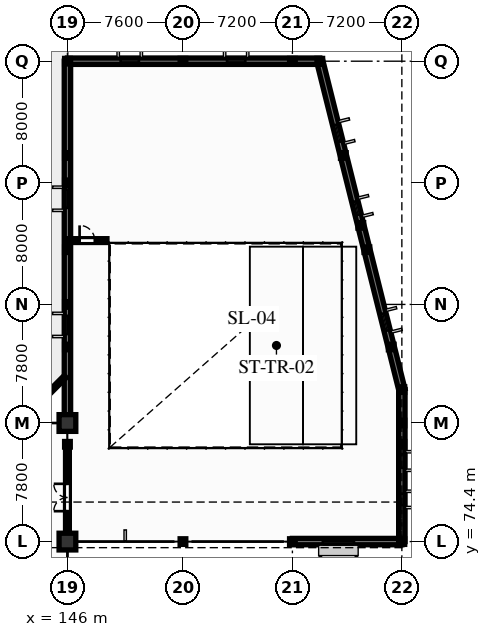
"""IFC4 building model, lengths in metres.
Left out: names, types, materials, properties, quantities, classifications, styles, units other than length and angle.
Written with IfcOpenShell. Run it as: python <this file> out.ifc"""

import sys

from ifc_helpers import new_model, si_unit, direction, frame, frame_2d, origin, origin_2d, place, context, subcontext, project, spatial, rectangle, i_section, extrude, element, fill, save


model = new_model("IFC4")
c1 = context("Model", 3, precision=1e-05, world=origin(), true_north=direction((0.0, 1.0)))
c2 = subcontext(c1, "Body", "Model", "MODEL_VIEW")
j1 = project(units=[si_unit("LENGTHUNIT", "METRE"), si_unit("PLANEANGLEUNIT", "RADIAN")], contexts=[c1])
p1 = place(None, origin())
s1 = spatial("IfcSite", under=j1, at=p1, CompositionType="ELEMENT")
p2 = place(p1, origin())
s2 = spatial("IfcBuilding", under=s1, at=p2, CompositionType="ELEMENT")
p3 = place(p2, frame((0.0, 0.0, 5.1)))
s3 = spatial("IfcBuildingStorey", under=s2, at=p3, CompositionType="ELEMENT", Elevation=5.1)
for number, where, z_axis, x_axis in (
    (1, (146.0, 74.4, 0.0), (0.0, 0.0, 1.0), (1.0, 0.0, 0.0)),
    (2, (146.0, 82.2, 0.0), (0.0, 0.0, 1.0), (1.0, 0.0, 0.0)),
):
    element("IfcColumn", number, at=place(p3, frame(where, z_axis=z_axis, x_axis=x_axis)), inside=s3, PredefinedType="COLUMN", context=c2, shape_type="SweptSolid", body=[
        extrude(rectangle(XDim=1.1, YDim=1.1, at=origin_2d()), origin(), (0.0, 0.0, 1.0), 3.84),
    ])
for number, where, z_axis, x_axis in (
    (3, (146.0, 90.0, 0.0), (0.0, 0.0, 1.0), (1.0, 0.0, 0.0)),
    (4, (146.0, 98.0, 0.0), (0.0, 0.0, 1.0), (1.0, 0.0, 0.0)),
    (5, (146.0, 106.0, 0.0), (0.0, 0.0, 1.0), (1.0, 0.0, 0.0)),
    (6, (153.6, 74.4, 0.0), (0.0, 0.0, 1.0), (1.0, 0.0, 0.0)),
    (7, (153.6, 106.0, 0.0), (0.0, 0.0, 1.0), (1.0, 0.0, 0.0)),
    (8, (160.8, 74.4, 0.0), (0.0, 0.0, 1.0), (1.0, 0.0, 0.0)),
    (9, (160.8, 106.0, 0.0), (0.0, 0.0, 1.0), (1.0, 0.0, 0.0)),
    (10, (162.6, 106.0, 0.0), (0.0, 0.0, 1.0), (1.0, 0.0, 0.0)),
    (11, (165.3, 95.2, 0.0), (0.0, 0.0, 1.0), (1.0, 0.0, 0.0)),
    (12, (168.0, 74.4, 0.0), (0.0, 0.0, 1.0), (1.0, 0.0, 0.0)),
    (13, (168.0, 82.2, 0.0), (0.0, 0.0, 1.0), (1.0, 0.0, 0.0)),
    (14, (168.0, 84.4, 0.0), (0.0, 0.0, 1.0), (1.0, 0.0, 0.0)),
    (15, (146.0, 80.8, 0.0), (0.0, 0.0, 1.0), (1.0, 0.0, 0.0)),
    (16, (168.0, 80.8, 0.0), (0.0, 0.0, 1.0), (1.0, 0.0, 0.0)),
    (17, (146.0, 87.2, 0.0), (0.0, 0.0, 1.0), (1.0, 0.0, 0.0)),
    (18, (167.3, 87.2, 0.0), (0.0, 0.0, 1.0), (1.0, 0.0, 0.0)),
    (19, (146.0, 93.6, 0.0), (0.0, 0.0, 1.0), (1.0, 0.0, 0.0)),
    (20, (165.7, 93.6, 0.0), (0.0, 0.0, 1.0), (1.0, 0.0, 0.0)),
    (21, (146.0, 99.8, 0.0), (0.0, 0.0, 1.0), (1.0, 0.0, 0.0)),
    (22, (164.15, 99.8, 0.0), (0.0, 0.0, 1.0), (1.0, 0.0, 0.0)),
):
    element("IfcColumn", number, at=place(p3, frame(where, z_axis=z_axis, x_axis=x_axis)), inside=s3, PredefinedType="COLUMN", context=c2, shape_type="SweptSolid", body=[
        extrude(i_section(OverallWidth=0.373, OverallDepth=0.368, WebThickness=0.015, FlangeThickness=0.024, at=origin_2d()), origin(), (0.0, 0.0, 1.0), 3.84),
    ])
p4 = place(p3, frame((160.8, 74.4, 0.0), z_axis=(0.0, 0.0, 1.0), x_axis=(1.0, 0.0, 0.0)))
e23 = element("IfcWall", 23, at=p4, inside=s3, PredefinedType="SOLIDWALL", context=c2, shape_type="SweptSolid", body=[
    extrude(rectangle(XDim=7.2, YDim=0.42, at=frame_2d((3.6, 0.0))), origin(), (0.0, 0.0, 1.0), 3.55),
])
p5 = place(p4, frame((2.0, 0.0, 0.9)))
e24 = element("IfcOpeningElement", 24, at=p5, cuts=e23, PredefinedType="OPENING", context=c2, shape_type="SweptSolid", body=[
    extrude(rectangle(XDim=2.05, YDim=1.85, at=frame_2d((1.025, 0.925))), frame((0.0, 0.22, 0.0), z_axis=(0.0, -1.0, 0.0), x_axis=(1.0, 0.0, 0.0)), (0.0, 0.0, 1.0), 0.44),
])
p6 = place(p3, frame((168.0, 74.4, 0.0), z_axis=(0.0, 0.0, 1.0), x_axis=(0.0, 1.0, 0.0)))
e25 = element("IfcWall", 25, at=p6, inside=s3, PredefinedType="SOLIDWALL", context=c2, shape_type="SweptSolid", body=[
    extrude(rectangle(XDim=10.0, YDim=0.42, at=frame_2d((5.0, 0.0))), origin(), (0.0, 0.0, 1.0), 3.55),
])
p7 = place(p6, frame((2.4, 0.0, 0.838)))
e26 = element("IfcOpeningElement", 26, at=p7, cuts=e25, PredefinedType="OPENING", context=c2, shape_type="SweptSolid", body=[
    extrude(rectangle(XDim=0.75, YDim=2.2, at=frame_2d((0.375, 1.1))), frame((0.0, 0.22, 0.0), z_axis=(0.0, -1.0, 0.0), x_axis=(1.0, 0.0, 0.0)), (0.0, 0.0, 1.0), 0.44),
])
p8 = place(p6, frame((4.85, 0.0, 0.838)))
e27 = element("IfcOpeningElement", 27, at=p8, cuts=e25, PredefinedType="OPENING", context=c2, shape_type="SweptSolid", body=[
    extrude(rectangle(XDim=0.9, YDim=2.2, at=frame_2d((0.45, 1.1))), frame((0.0, 0.22, 0.0), z_axis=(0.0, -1.0, 0.0), x_axis=(1.0, 0.0, 0.0)), (0.0, 0.0, 1.0), 0.44),
])
p9 = place(p3, frame((168.0, 84.4, 0.0), z_axis=(0.0, 0.0, 1.0), x_axis=(-0.242530464893, 0.970143790167, 0.0)))
e28 = element("IfcWall", 28, at=p9, inside=s3, PredefinedType="SOLIDWALL", context=c2, shape_type="SweptSolid", body=[
    extrude(rectangle(XDim=22.265, YDim=0.42, at=frame_2d((11.132, 0.0))), origin(), (0.0, 0.0, 1.0), 3.55),
])
p10 = place(p9, frame((4.0, 0.0, 1.0)))
e29 = element("IfcOpeningElement", 29, at=p10, cuts=e28, PredefinedType="OPENING", context=c2, shape_type="SweptSolid", body=[
    extrude(rectangle(XDim=1.15, YDim=2.3, at=frame_2d((0.575, 1.15))), frame((0.0, 0.22, 0.0), z_axis=(0.0, -1.0, 0.0), x_axis=(1.0, 0.0, 0.0)), (0.0, 0.0, 1.0), 0.44),
])
p11 = place(p9, frame((11.85, 0.0, 1.0)))
e30 = element("IfcOpeningElement", 30, at=p11, cuts=e28, PredefinedType="OPENING", context=c2, shape_type="SweptSolid", body=[
    extrude(rectangle(XDim=0.9, YDim=2.2, at=frame_2d((0.45, 1.1))), frame((0.0, 0.22, 0.0), z_axis=(0.0, -1.0, 0.0), x_axis=(1.0, 0.0, 0.0)), (0.0, 0.0, 1.0), 0.44),
])
p12 = place(p9, frame((16.8, 0.0, 1.0)))
e31 = element("IfcOpeningElement", 31, at=p12, cuts=e28, PredefinedType="OPENING", context=c2, shape_type="SweptSolid", body=[
    extrude(rectangle(XDim=1.15, YDim=2.3, at=frame_2d((0.575, 1.15))), frame((0.0, 0.22, 0.0), z_axis=(0.0, -1.0, 0.0), x_axis=(1.0, 0.0, 0.0)), (0.0, 0.0, 1.0), 0.44),
])
p13 = place(p3, frame((146.0, 106.0, 0.0), z_axis=(0.0, 0.0, 1.0), x_axis=(1.0, 0.0, 0.0)))
e32 = element("IfcWall", 32, at=p13, inside=s3, PredefinedType="SOLIDWALL", context=c2, shape_type="SweptSolid", body=[
    extrude(rectangle(XDim=16.6, YDim=0.42, at=frame_2d((8.3, 0.0))), origin(), (0.0, 0.0, 1.0), 3.55),
])
p14 = place(p13, frame((3.5, 0.0, 0.793)))
e33 = element("IfcOpeningElement", 33, at=p14, cuts=e32, PredefinedType="OPENING", context=c2, shape_type="SweptSolid", body=[
    extrude(rectangle(XDim=1.2, YDim=2.1, at=frame_2d((0.6, 1.05))), frame((0.0, 0.22, 0.0), z_axis=(0.0, -1.0, 0.0), x_axis=(1.0, 0.0, 0.0)), (0.0, 0.0, 1.0), 0.44),
])
p15 = place(p13, frame((10.5, 0.0, 0.793)))
e34 = element("IfcOpeningElement", 34, at=p15, cuts=e32, PredefinedType="OPENING", context=c2, shape_type="SweptSolid", body=[
    extrude(rectangle(XDim=1.2, YDim=2.1, at=frame_2d((0.6, 1.05))), frame((0.0, 0.22, 0.0), z_axis=(0.0, -1.0, 0.0), x_axis=(1.0, 0.0, 0.0)), (0.0, 0.0, 1.0), 0.44),
])
p16 = place(p3, frame((146.0, 82.2, 0.0), z_axis=(0.0, 0.0, 1.0), x_axis=(0.0, 1.0, 0.0)))
e35 = element("IfcWall", 35, at=p16, inside=s3, PredefinedType="SOLIDWALL", context=c2, shape_type="SweptSolid", body=[
    extrude(rectangle(XDim=23.8, YDim=0.42, at=frame_2d((11.9, 0.0))), origin(), (0.0, 0.0, 1.0), 3.84),
])
p17 = place(p16, frame((5.85, 0.0, 0.9)))
e36 = element("IfcOpeningElement", 36, at=p17, cuts=e35, PredefinedType="OPENING", context=c2, shape_type="SweptSolid", body=[
    extrude(rectangle(XDim=1.2, YDim=2.1, at=frame_2d((0.6, 1.05))), frame((0.0, 0.22, 0.0), z_axis=(0.0, -1.0, 0.0), x_axis=(1.0, 0.0, 0.0)), (0.0, 0.0, 1.0), 0.44),
])
p18 = place(p16, frame((14.15, 0.0, 0.9)))
e37 = element("IfcOpeningElement", 37, at=p18, cuts=e35, PredefinedType="OPENING", context=c2, shape_type="SweptSolid", body=[
    extrude(rectangle(XDim=1.2, YDim=2.1, at=frame_2d((0.6, 1.05))), frame((0.0, 0.22, 0.0), z_axis=(0.0, -1.0, 0.0), x_axis=(1.0, 0.0, 0.0)), (0.0, 0.0, 1.0), 0.44),
])
p19 = place(p3, frame((142.941, 82.341, 0.0), z_axis=(0.0, 0.0, 1.0), x_axis=(0.707106781187, 0.707106781187, 0.0)))
e38 = element("IfcWall", 38, at=p19, inside=s3, PredefinedType="PARAPET", context=c2, shape_type="SweptSolid", body=[
    extrude(rectangle(XDim=4.125, YDim=0.2, at=frame_2d((2.063, 0.0))), origin(), (0.0, 0.0, 1.0), 0.72),
])
p20 = place(p3, frame((146.0, 74.4, 0.0), z_axis=(0.0, 0.0, 1.0), x_axis=(0.0, 1.0, 0.0)))
e39 = element("IfcWall", 39, at=p20, inside=s3, PredefinedType="PARTITIONING", context=c2, shape_type="SweptSolid", body=[
    extrude(rectangle(XDim=6.0, YDim=0.25, at=frame_2d((3.0, 0.0))), origin(), (0.0, 0.0, 1.0), 3.073),
])
p21 = place(p20, frame((2.0, 0.0, 0.0)))
e40 = element("IfcOpeningElement", 40, at=p21, cuts=e39, PredefinedType="OPENING", context=c2, shape_type="SweptSolid", body=[
    extrude(rectangle(XDim=1.8, YDim=2.3, at=frame_2d((0.9, 1.15))), frame((0.0, 0.135, 0.0), z_axis=(0.0, -1.0, 0.0), x_axis=(1.0, 0.0, 0.0)), (0.0, 0.0, 1.0), 0.27),
])
p22 = place(p3, frame((146.0, 94.2, 0.0), z_axis=(0.0, 0.0, 1.0), x_axis=(1.0, 0.0, 0.0)))
e41 = element("IfcWall", 41, at=p22, inside=s3, PredefinedType="PARTITIONING", context=c2, shape_type="SweptSolid", body=[
    extrude(rectangle(XDim=2.6, YDim=0.25, at=frame_2d((1.3, 0.0))), origin(), (0.0, 0.0, 1.0), 3.55),
])
p23 = place(p22, frame((0.8, 0.0, 0.0)))
e42 = element("IfcOpeningElement", 42, at=p23, cuts=e41, PredefinedType="OPENING", context=c2, shape_type="SweptSolid", body=[
    extrude(rectangle(XDim=1.0, YDim=2.15, at=frame_2d((0.5, 1.075))), frame((0.0, 0.135, 0.0), z_axis=(0.0, -1.0, 0.0), x_axis=(1.0, 0.0, 0.0)), (0.0, 0.0, 1.0), 0.27),
])
p24 = place(p5, origin())
e43 = element("IfcWindow", 43, at=p24, inside=s3, PartitioningType="SINGLE_PANEL", PredefinedType="WINDOW", context=c2, shape_type="SweptSolid", body=[
    extrude(rectangle(XDim=2.05, YDim=1.85, at=frame_2d((1.025, 0.925))), frame((0.0, 0.03, 0.0), z_axis=(0.0, -1.0, 0.0), x_axis=(1.0, 0.0, 0.0)), (0.0, 0.0, 1.0), 0.06),
])
fill(e24, e43)
p25 = place(p7, origin())
e44 = element("IfcWindow", 44, at=p25, inside=s3, PartitioningType="SINGLE_PANEL", PredefinedType="WINDOW", context=c2, shape_type="SweptSolid", body=[
    extrude(rectangle(XDim=0.75, YDim=2.2, at=frame_2d((0.375, 1.1))), frame((0.0, 0.03, 0.0), z_axis=(0.0, -1.0, 0.0), x_axis=(1.0, 0.0, 0.0)), (0.0, 0.0, 1.0), 0.06),
])
fill(e26, e44)
p26 = place(p8, origin())
e45 = element("IfcWindow", 45, at=p26, inside=s3, PartitioningType="SINGLE_PANEL", PredefinedType="WINDOW", context=c2, shape_type="SweptSolid", body=[
    extrude(rectangle(XDim=0.9, YDim=2.2, at=frame_2d((0.45, 1.1))), frame((0.0, 0.03, 0.0), z_axis=(0.0, -1.0, 0.0), x_axis=(1.0, 0.0, 0.0)), (0.0, 0.0, 1.0), 0.06),
])
fill(e27, e45)
p27 = place(p10, origin())
e46 = element("IfcWindow", 46, at=p27, inside=s3, PartitioningType="SINGLE_PANEL", PredefinedType="WINDOW", context=c2, shape_type="SweptSolid", body=[
    extrude(rectangle(XDim=1.15, YDim=2.3, at=frame_2d((0.575, 1.15))), frame((0.0, 0.03, 0.0), z_axis=(0.0, -1.0, 0.0), x_axis=(1.0, 0.0, 0.0)), (0.0, 0.0, 1.0), 0.06),
])
fill(e29, e46)
p28 = place(p11, origin())
e47 = element("IfcWindow", 47, at=p28, inside=s3, PartitioningType="SINGLE_PANEL", PredefinedType="WINDOW", context=c2, shape_type="SweptSolid", body=[
    extrude(rectangle(XDim=0.9, YDim=2.2, at=frame_2d((0.45, 1.1))), frame((0.0, 0.03, 0.0), z_axis=(0.0, -1.0, 0.0), x_axis=(1.0, 0.0, 0.0)), (0.0, 0.0, 1.0), 0.06),
])
fill(e30, e47)
p29 = place(p12, origin())
e48 = element("IfcWindow", 48, at=p29, inside=s3, PartitioningType="SINGLE_PANEL", PredefinedType="WINDOW", context=c2, shape_type="SweptSolid", body=[
    extrude(rectangle(XDim=1.15, YDim=2.3, at=frame_2d((0.575, 1.15))), frame((0.0, 0.03, 0.0), z_axis=(0.0, -1.0, 0.0), x_axis=(1.0, 0.0, 0.0)), (0.0, 0.0, 1.0), 0.06),
])
fill(e31, e48)
p30 = place(p14, origin())
e49 = element("IfcWindow", 49, at=p30, inside=s3, PartitioningType="SINGLE_PANEL", PredefinedType="WINDOW", context=c2, shape_type="SweptSolid", body=[
    extrude(rectangle(XDim=1.2, YDim=2.1, at=frame_2d((0.6, 1.05))), frame((0.0, 0.03, 0.0), z_axis=(0.0, -1.0, 0.0), x_axis=(1.0, 0.0, 0.0)), (0.0, 0.0, 1.0), 0.06),
])
fill(e33, e49)
p31 = place(p15, origin())
e50 = element("IfcWindow", 50, at=p31, inside=s3, PartitioningType="SINGLE_PANEL", PredefinedType="WINDOW", context=c2, shape_type="SweptSolid", body=[
    extrude(rectangle(XDim=1.2, YDim=2.1, at=frame_2d((0.6, 1.05))), frame((0.0, 0.03, 0.0), z_axis=(0.0, -1.0, 0.0), x_axis=(1.0, 0.0, 0.0)), (0.0, 0.0, 1.0), 0.06),
])
fill(e34, e50)
p32 = place(p17, origin())
e51 = element("IfcWindow", 51, at=p32, inside=s3, PartitioningType="SINGLE_PANEL", PredefinedType="WINDOW", context=c2, shape_type="SweptSolid", body=[
    extrude(rectangle(XDim=1.2, YDim=2.1, at=frame_2d((0.6, 1.05))), frame((0.0, 0.03, 0.0), z_axis=(0.0, -1.0, 0.0), x_axis=(1.0, 0.0, 0.0)), (0.0, 0.0, 1.0), 0.06),
])
fill(e36, e51)
p33 = place(p18, origin())
e52 = element("IfcWindow", 52, at=p33, inside=s3, PartitioningType="SINGLE_PANEL", PredefinedType="WINDOW", context=c2, shape_type="SweptSolid", body=[
    extrude(rectangle(XDim=1.2, YDim=2.1, at=frame_2d((0.6, 1.05))), frame((0.0, 0.03, 0.0), z_axis=(0.0, -1.0, 0.0), x_axis=(1.0, 0.0, 0.0)), (0.0, 0.0, 1.0), 0.06),
])
fill(e37, e52)
p34 = place(p21, origin())
e53 = element("IfcDoor", 53, at=p34, inside=s3, OperationType="DOUBLE_DOOR_SINGLE_SWING", PredefinedType="DOOR", context=c2, shape_type="SweptSolid", body=[
    extrude(rectangle(XDim=1.8, YDim=2.3, at=frame_2d((0.9, 1.15))), frame((0.0, 0.025, 0.0), z_axis=(0.0, -1.0, 0.0), x_axis=(1.0, 0.0, 0.0)), (0.0, 0.0, 1.0), 0.05),
])
fill(e40, e53)
p35 = place(p23, origin())
e54 = element("IfcDoor", 54, at=p35, inside=s3, OperationType="SINGLE_SWING_LEFT", PredefinedType="DOOR", context=c2, shape_type="SweptSolid", body=[
    extrude(rectangle(XDim=1.0, YDim=2.15, at=frame_2d((0.5, 1.075))), frame((0.0, 0.025, 0.0), z_axis=(0.0, -1.0, 0.0), x_axis=(1.0, 0.0, 0.0)), (0.0, 0.0, 1.0), 0.05),
])
fill(e42, e54)
save(model, sys.argv[1])
